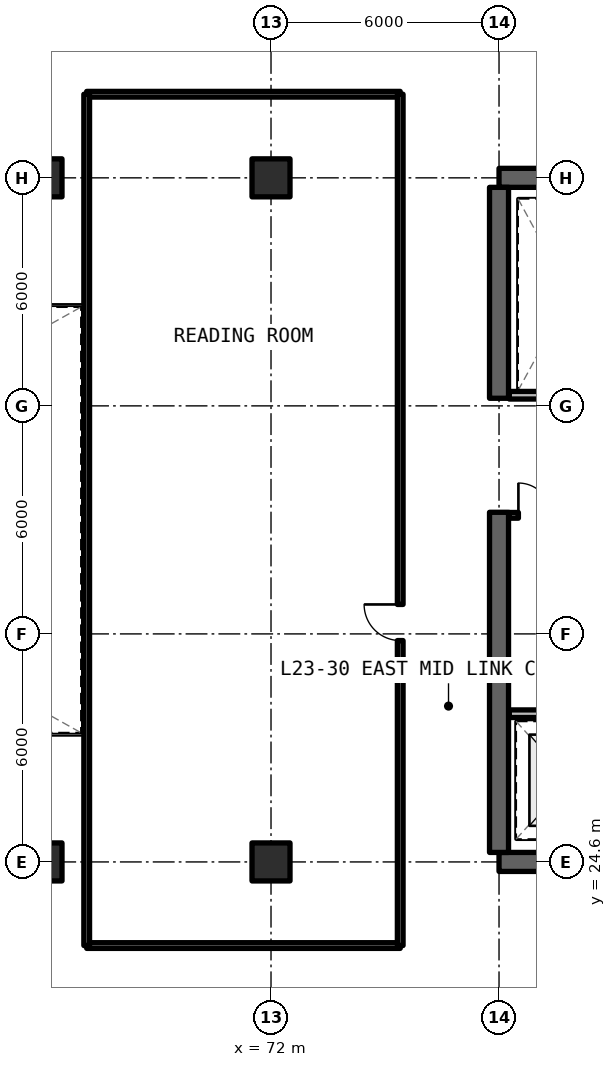
"""IFC4 building model, lengths in metres.
Left out: names, types, materials, properties, quantities, classifications, styles, units other than length and angle.
Written with IfcOpenShell. Run it as: python <this file> out.ifc"""

import sys

from ifc_helpers import new_model, si_unit, direction, frame, frame_2d, origin, origin_2d, place, context, subcontext, project, spatial, rectangle, extrude, element, fill, save


model = new_model("IFC4")
c1 = context("Model", 3, precision=1e-05, world=origin(), true_north=direction((0.0, 1.0)))
c2 = subcontext(c1, "Body", "Model", "MODEL_VIEW")
j1 = project(units=[si_unit("LENGTHUNIT", "METRE"), si_unit("PLANEANGLEUNIT", "RADIAN")], contexts=[c1])
p1 = place(None, origin())
s1 = spatial("IfcSite", under=j1, at=p1, CompositionType="ELEMENT")
p2 = place(p1, origin())
s2 = spatial("IfcBuilding", under=s1, at=p2, CompositionType="ELEMENT")
p3 = place(p2, frame((0.0, 0.0, 85.47)))
s3 = spatial("IfcBuildingStorey", under=s2, at=p3, CompositionType="ELEMENT", Elevation=85.47)
for number, where, z_axis, x_axis in (
    (1, (78.0, 24.6, 0.0), (0.0, 0.0, 1.0), (1.0, 0.0, 0.0)),
    (2, (90.0, 42.6, 0.0), (0.0, 0.0, 1.0), (-1.0, 0.0, 0.0)),
):
    element("IfcWall", number, at=place(p3, frame(where, z_axis=z_axis, x_axis=x_axis)), inside=s3, PredefinedType="SHEAR", context=c2, shape_type="SweptSolid", body=[
        extrude(rectangle(XDim=12.0, YDim=0.5, at=frame_2d((6.0, 0.0))), origin(), (0.0, 0.0, 1.0), 3.3),
    ])
p4 = place(p3, frame((78.0, 24.85, 0.0), z_axis=(0.0, 0.0, 1.0), x_axis=(0.0, 1.0, 0.0)))
e3 = element("IfcWall", 3, at=p4, inside=s3, PredefinedType="SHEAR", context=c2, shape_type="SweptSolid", body=[
    extrude(rectangle(XDim=8.95, YDim=0.5, at=frame_2d((4.475, 0.0))), origin(), (0.0, 0.0, 1.0), 3.3),
])
p5 = place(p3, frame((78.0, 36.8, 0.0), z_axis=(0.0, 0.0, 1.0), x_axis=(0.0, 1.0, 0.0)))
e4 = element("IfcWall", 4, at=p5, inside=s3, PredefinedType="SHEAR", context=c2, shape_type="SweptSolid", body=[
    extrude(rectangle(XDim=5.55, YDim=0.5, at=frame_2d((2.775, 0.0))), origin(), (0.0, 0.0, 1.0), 3.3),
])
for number, where, z_axis, x_axis in (
    (5, (66.0, 24.6, 0.0), (0.0, 0.0, 1.0), (1.0, 0.0, 0.0)),
    (6, (66.0, 42.6, 0.0), (0.0, 0.0, 1.0), (1.0, 0.0, 0.0)),
    (7, (72.0, 24.6, 0.0), (0.0, 0.0, 1.0), (1.0, 0.0, 0.0)),
    (8, (72.0, 42.6, 0.0), (0.0, 0.0, 1.0), (1.0, 0.0, 0.0)),
):
    element("IfcColumn", number, at=place(p3, frame(where, z_axis=z_axis, x_axis=x_axis)), inside=s3, PredefinedType="COLUMN", context=c2, shape_type="SweptSolid", body=[
        extrude(rectangle(XDim=1.0, YDim=1.0, at=origin_2d()), origin(), (0.0, 0.0, 1.0), 3.3),
    ])
p6 = place(p3, frame((78.27, 28.5, 0.0), z_axis=(0.0, 0.0, 1.0), x_axis=(1.0, 0.0, 0.0)))
e9 = element("IfcWall", 9, at=p6, inside=s3, PredefinedType="SOLIDWALL", context=c2, shape_type="SweptSolid", body=[
    extrude(rectangle(XDim=7.51, YDim=0.2, at=frame_2d((3.755, 0.0))), origin(), (0.0, 0.0, 1.0), 2.35),
])
p7 = place(p6, frame((3.53, 0.0, 0.0)))
e10 = element("IfcOpeningElement", 10, at=p7, cuts=e9, PredefinedType="OPENING", context=c2, shape_type="SweptSolid", body=[
    extrude(rectangle(XDim=1.0, YDim=2.15, at=frame_2d((0.5, 1.075))), frame((0.0, 0.11, 0.0), z_axis=(0.0, -1.0, 0.0), x_axis=(1.0, 0.0, 0.0)), (0.0, 0.0, 1.0), 0.22),
])
p8 = place(p3, frame((78.27, 33.72, 0.0), z_axis=(0.0, 0.0, 1.0), x_axis=(1.0, 0.0, 0.0)))
e11 = element("IfcWall", 11, at=p8, inside=s3, PredefinedType="SOLIDWALL", context=c2, shape_type="SweptSolid", body=[
    extrude(rectangle(XDim=1.37, YDim=0.15, at=frame_2d((0.685, 0.0))), origin(), (0.0, 0.0, 1.0), 2.35),
])
p9 = place(p8, frame((0.24, 0.0, 0.0)))
e12 = element("IfcOpeningElement", 12, at=p9, cuts=e11, PredefinedType="OPENING", context=c2, shape_type="SweptSolid", body=[
    extrude(rectangle(XDim=0.85, YDim=2.1, at=frame_2d((0.425, 1.05))), frame((0.0, 0.085, 0.0), z_axis=(0.0, -1.0, 0.0), x_axis=(1.0, 0.0, 0.0)), (0.0, 0.0, 1.0), 0.17),
])
p10 = place(p3, frame((78.27, 36.88, 0.0), z_axis=(0.0, 0.0, 1.0), x_axis=(1.0, 0.0, 0.0)))
e13 = element("IfcWall", 13, at=p10, inside=s3, PredefinedType="SOLIDWALL", context=c2, shape_type="SweptSolid", body=[
    extrude(rectangle(XDim=3.05, YDim=0.2, at=frame_2d((1.525, 0.0))), origin(), (0.0, 0.0, 1.0), 2.35),
])
for number, where, z_axis, x_axis in (
    (14, (67.15, 22.4, 0.0), (0.0, 0.0, 1.0), (1.0, 0.0, 0.0)),
    (15, (67.15, 44.8, 0.0), (0.0, 0.0, 1.0), (1.0, 0.0, 0.0)),
):
    element("IfcWall", number, at=place(p3, frame(where, z_axis=z_axis, x_axis=x_axis)), inside=s3, PredefinedType="SOLIDWALL", context=c2, shape_type="SweptSolid", body=[
        extrude(rectangle(XDim=8.25, YDim=0.15, at=frame_2d((4.125, 0.0))), origin(), (0.0, 0.0, 1.0), 2.35),
    ])
p11 = place(p3, frame((67.15, 22.4, 0.0), z_axis=(0.0, 0.0, 1.0), x_axis=(0.0, 1.0, 0.0)))
e16 = element("IfcWall", 16, at=p11, inside=s3, PredefinedType="SOLIDWALL", context=c2, shape_type="SweptSolid", body=[
    extrude(rectangle(XDim=22.4, YDim=0.15, at=frame_2d((11.2, 0.0))), origin(), (0.0, 0.0, 1.0), 2.35),
])
p12 = place(p3, frame((75.4, 22.4, 0.0), z_axis=(0.0, 0.0, 1.0), x_axis=(0.0, 1.0, 0.0)))
e17 = element("IfcWall", 17, at=p12, inside=s3, PredefinedType="SOLIDWALL", context=c2, shape_type="SweptSolid", body=[
    extrude(rectangle(XDim=22.4, YDim=0.15, at=frame_2d((11.2, 0.0))), origin(), (0.0, 0.0, 1.0), 2.35),
])
p13 = place(p12, frame((8.025, 0.0, 0.0)))
e18 = element("IfcOpeningElement", 18, at=p13, cuts=e17, PredefinedType="OPENING", context=c2, shape_type="SweptSolid", body=[
    extrude(rectangle(XDim=0.95, YDim=2.15, at=frame_2d((0.475, 1.075))), frame((0.0, 0.085, 0.0), z_axis=(0.0, -1.0, 0.0), x_axis=(1.0, 0.0, 0.0)), (0.0, 0.0, 1.0), 0.17),
])
p14 = place(p9, origin())
e19 = element("IfcDoor", 19, at=p14, inside=s3, OperationType="SINGLE_SWING_LEFT", PredefinedType="DOOR", context=c2, shape_type="SweptSolid", body=[
    extrude(rectangle(XDim=0.85, YDim=2.1, at=frame_2d((0.425, 1.05))), frame((0.0, 0.025, 0.0), z_axis=(0.0, -1.0, 0.0), x_axis=(1.0, 0.0, 0.0)), (0.0, 0.0, 1.0), 0.05),
])
fill(e12, e19)
p15 = place(p13, origin())
e20 = element("IfcDoor", 20, at=p15, inside=s3, OperationType="SINGLE_SWING_RIGHT", PredefinedType="DOOR", context=c2, shape_type="SweptSolid", body=[
    extrude(rectangle(XDim=0.95, YDim=2.15, at=frame_2d((0.475, 1.075))), frame((0.0, 0.025, 0.0), z_axis=(0.0, -1.0, 0.0), x_axis=(1.0, 0.0, 0.0)), (0.0, 0.0, 1.0), 0.05),
])
fill(e18, e20)
save(model, sys.argv[1])
